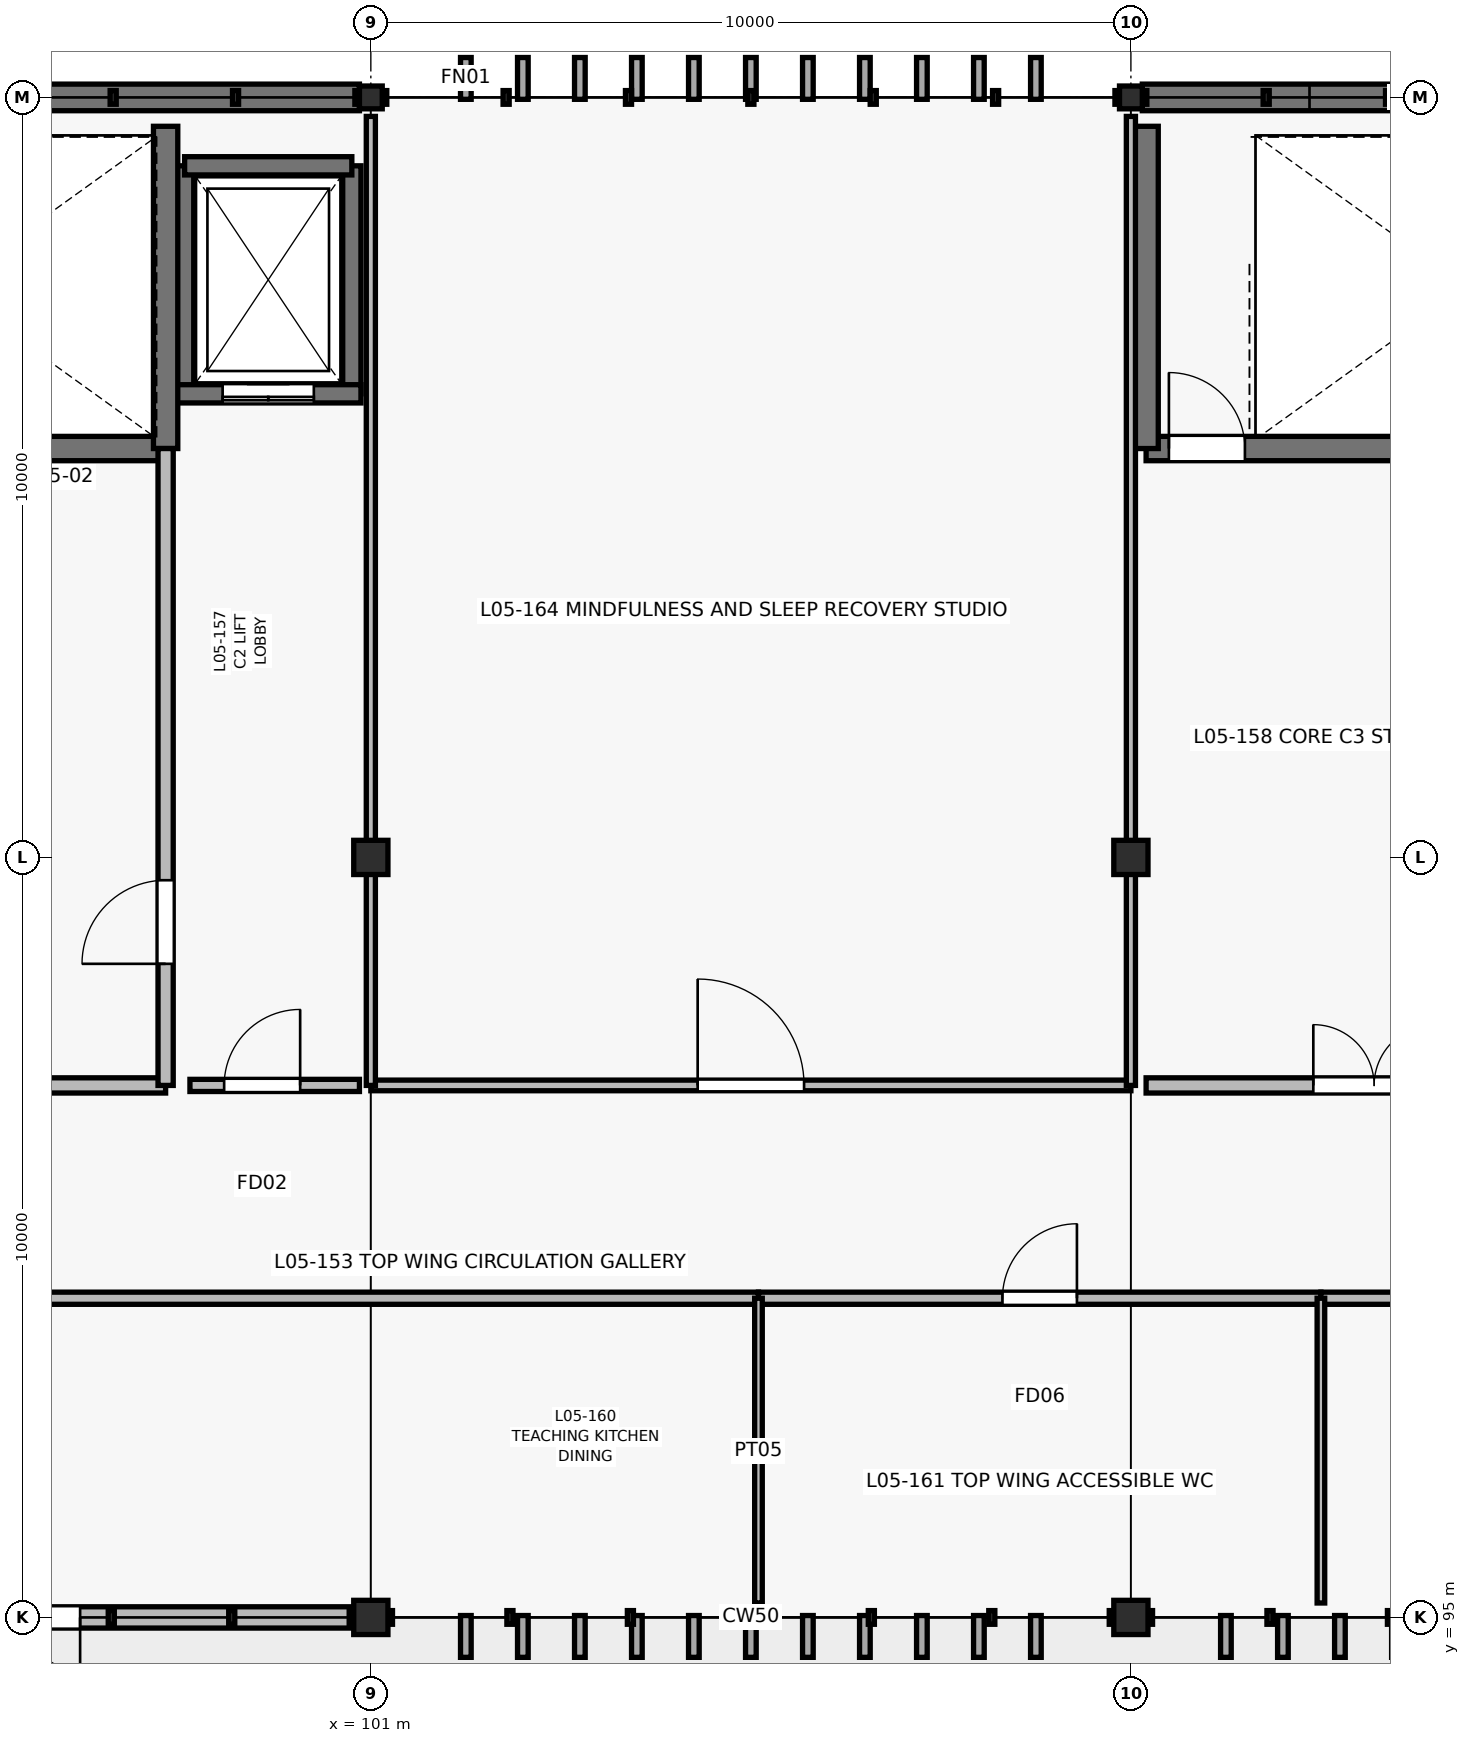
"""IFC4 building model, lengths in metres.
Left out: names, types, materials, properties, quantities, classifications, styles, units other than length and angle.
Written with IfcOpenShell. Run it as: python <this file> out.ifc"""

import sys

from ifc_helpers import new_model, si_unit, direction, frame, frame_2d, origin, origin_2d, place, context, subcontext, project, spatial, rectangle, i_section, extrude, element, fill, save


model = new_model("IFC4")
c1 = context("Model", 3, precision=1e-05, world=origin(), true_north=direction((0.0, 1.0)))
c2 = subcontext(c1, "Body", "Model", "MODEL_VIEW")
j1 = project(units=[si_unit("LENGTHUNIT", "METRE"), si_unit("PLANEANGLEUNIT", "RADIAN")], contexts=[c1])
p1 = place(None, origin())
s1 = spatial("IfcSite", under=j1, at=p1, CompositionType="ELEMENT")
p2 = place(p1, origin())
s2 = spatial("IfcBuilding", under=s1, at=p2, CompositionType="ELEMENT")
p3 = place(p2, frame((0.0, 0.0, 21.6)))
s3 = spatial("IfcBuildingStorey", under=s2, at=p3, CompositionType="ELEMENT", Elevation=21.6)
for number, where, z_axis, x_axis in (
    (1, (101.0, 95.0, 0.0), (0.0, 0.0, 1.0), (1.0, 0.0, 0.0)),
    (2, (101.0, 105.0, 0.0), (0.0, 0.0, 1.0), (1.0, 0.0, 0.0)),
):
    element("IfcColumn", number, at=place(p3, frame(where, z_axis=z_axis, x_axis=x_axis)), inside=s3, PredefinedType="COLUMN", context=c2, shape_type="SweptSolid", body=[
        extrude(rectangle(XDim=0.45, YDim=0.45, at=origin_2d()), origin(), (0.0, 0.0, 1.0), 4.2),
    ])
p4 = place(p3, frame((101.0, 115.0, 0.0), z_axis=(0.0, 0.0, 1.0), x_axis=(1.0, 0.0, 0.0)))
e3 = element("IfcColumn", 3, at=p4, inside=s3, PredefinedType="COLUMN", context=c2, shape_type="SweptSolid", body=[
    extrude(i_section(OverallWidth=0.3, OverallDepth=0.3, WebThickness=0.011, FlangeThickness=0.019, at=origin_2d()), origin(), (0.0, 0.0, 1.0), 4.2),
])
for number, where, z_axis, x_axis in (
    (4, (111.0, 95.0, 0.0), (0.0, 0.0, 1.0), (1.0, 0.0, 0.0)),
    (5, (111.0, 105.0, 0.0), (0.0, 0.0, 1.0), (1.0, 0.0, 0.0)),
):
    element("IfcColumn", number, at=place(p3, frame(where, z_axis=z_axis, x_axis=x_axis)), inside=s3, PredefinedType="COLUMN", context=c2, shape_type="SweptSolid", body=[
        extrude(rectangle(XDim=0.45, YDim=0.45, at=origin_2d()), origin(), (0.0, 0.0, 1.0), 4.2),
    ])
p5 = place(p3, frame((111.0, 115.0, 0.0), z_axis=(0.0, 0.0, 1.0), x_axis=(1.0, 0.0, 0.0)))
e6 = element("IfcColumn", 6, at=p5, inside=s3, PredefinedType="COLUMN", context=c2, shape_type="SweptSolid", body=[
    extrude(i_section(OverallWidth=0.3, OverallDepth=0.3, WebThickness=0.011, FlangeThickness=0.019, at=origin_2d()), origin(), (0.0, 0.0, 1.0), 4.2),
])
p6 = place(p3, frame((91.15, 115.0, 0.0), z_axis=(0.0, 0.0, 1.0), x_axis=(1.0, 0.0, 0.0)))
e7 = element("IfcWall", 7, at=p6, inside=s3, PredefinedType="SOLIDWALL", context=c2, shape_type="SweptSolid", body=[
    extrude(rectangle(XDim=9.7, YDim=0.35, at=frame_2d((4.85, 0.0))), origin(), (0.0, 0.0, 1.0), 4.2),
])
p7 = place(p6, frame((2.2, 0.0, 1.0)))
e8 = element("IfcOpeningElement", 8, at=p7, cuts=e7, PredefinedType="OPENING", context=c2, shape_type="SweptSolid", body=[
    extrude(rectangle(XDim=2.1, YDim=1.5, at=frame_2d((1.05, 0.75))), frame((0.0, 0.185, 0.0), z_axis=(0.0, -1.0, 0.0), x_axis=(1.0, 0.0, 0.0)), (0.0, 0.0, 1.0), 0.37),
])
p8 = place(p3, frame((111.15, 115.0, 0.0), z_axis=(0.0, 0.0, 1.0), x_axis=(1.0, 0.0, 0.0)))
e9 = element("IfcWall", 9, at=p8, inside=s3, PredefinedType="SOLIDWALL", context=c2, shape_type="SweptSolid", body=[
    extrude(rectangle(XDim=9.7, YDim=0.35, at=frame_2d((4.85, 0.0))), origin(), (0.0, 0.0, 1.0), 4.2),
])
p9 = place(p8, frame((2.2, 0.0, 1.0)))
e10 = element("IfcOpeningElement", 10, at=p9, cuts=e9, PredefinedType="OPENING", context=c2, shape_type="SweptSolid", body=[
    extrude(rectangle(XDim=2.7, YDim=1.5, at=frame_2d((1.35, 0.75))), frame((0.0, 0.185, 0.0), z_axis=(0.0, -1.0, 0.0), x_axis=(1.0, 0.0, 0.0)), (0.0, 0.0, 1.0), 0.37),
])
p10 = place(p3, frame((100.775, 95.0, 0.0), z_axis=(0.0, 0.0, 1.0), x_axis=(-1.0, 0.0, 0.0)))
e11 = element("IfcWall", 11, at=p10, inside=s3, PredefinedType="SOLIDWALL", context=c2, shape_type="SweptSolid", body=[
    extrude(rectangle(XDim=9.55, YDim=0.28, at=frame_2d((4.775, 0.0))), origin(), (0.0, 0.0, 1.0), 3.25),
])
p11 = place(p10, frame((3.6, 0.0, 0.0)))
e12 = element("IfcOpeningElement", 12, at=p11, cuts=e11, PredefinedType="OPENING", context=c2, shape_type="SweptSolid", body=[
    extrude(rectangle(XDim=1.4, YDim=2.2, at=frame_2d((0.7, 1.1))), frame((0.0, 0.15, 0.0), z_axis=(0.0, -1.0, 0.0), x_axis=(1.0, 0.0, 0.0)), (0.0, 0.0, 1.0), 0.3),
])
for number, where, z_axis, x_axis in (
    (13, (98.55, 111.1, 0.0), (0.0, 0.0, 1.0), (0.0, 1.0, 0.0)),
    (14, (100.75, 114.1, 0.0), (0.0, 0.0, 1.0), (0.0, -1.0, 0.0)),
):
    element("IfcWall", number, at=place(p3, frame(where, z_axis=z_axis, x_axis=x_axis)), inside=s3, PredefinedType="SHEAR", context=c2, shape_type="SweptSolid", body=[
        extrude(rectangle(XDim=3.0, YDim=0.24, at=frame_2d((1.5, 0.0))), origin(), (0.0, 0.0, 1.0), 3.95),
    ])
p12 = place(p3, frame((98.55, 114.1, 0.0), z_axis=(0.0, 0.0, 1.0), x_axis=(1.0, 0.0, 0.0)))
e15 = element("IfcWall", 15, at=p12, inside=s3, PredefinedType="SHEAR", context=c2, shape_type="SweptSolid", body=[
    extrude(rectangle(XDim=2.2, YDim=0.24, at=frame_2d((1.1, 0.0))), origin(), (0.0, 0.0, 1.0), 3.95),
])
p13 = place(p3, frame((100.87, 111.1, 0.0), z_axis=(0.0, 0.0, 1.0), x_axis=(-1.0, 0.0, 0.0)))
e16 = element("IfcWall", 16, at=p13, inside=s3, PredefinedType="SHEAR", context=c2, shape_type="SweptSolid", body=[
    extrude(rectangle(XDim=2.44, YDim=0.24, at=frame_2d((1.22, 0.0))), origin(), (0.0, 0.0, 1.0), 3.95),
])
p14 = place(p13, frame((0.62, 0.0, 0.0)))
e17 = element("IfcOpeningElement", 17, at=p14, cuts=e16, PredefinedType="OPENING", context=c2, shape_type="SweptSolid", body=[
    extrude(rectangle(XDim=1.2, YDim=2.15, at=frame_2d((0.6, 1.075))), frame((0.0, 0.13, 0.0), z_axis=(0.0, -1.0, 0.0), x_axis=(1.0, 0.0, 0.0)), (0.0, 0.0, 1.0), 0.26),
])
p15 = place(p3, frame((91.2, 110.38, 0.0), z_axis=(0.0, 0.0, 1.0), x_axis=(1.0, 0.0, 0.0)))
e18 = element("IfcWall", 18, at=p15, inside=s3, PredefinedType="SHEAR", context=c2, shape_type="SweptSolid", body=[
    extrude(rectangle(XDim=7.1, YDim=0.32, at=frame_2d((3.55, 0.0))), origin(), (0.0, 0.0, 1.0), 3.95),
])
p16 = place(p15, frame((0.3, 0.0, 0.0)))
e19 = element("IfcOpeningElement", 19, at=p16, cuts=e18, PredefinedType="OPENING", context=c2, shape_type="SweptSolid", body=[
    extrude(rectangle(XDim=1.0, YDim=2.15, at=frame_2d((0.5, 1.075))), frame((0.0, 0.17, 0.0), z_axis=(0.0, -1.0, 0.0), x_axis=(1.0, 0.0, 0.0)), (0.0, 0.0, 1.0), 0.34),
])
p17 = place(p3, frame((98.3, 110.38, 0.0), z_axis=(0.0, 0.0, 1.0), x_axis=(0.0, 1.0, 0.0)))
e20 = element("IfcWall", 20, at=p17, inside=s3, PredefinedType="SHEAR", context=c2, shape_type="SweptSolid", body=[
    extrude(rectangle(XDim=4.24, YDim=0.32, at=frame_2d((2.12, 0.0))), origin(), (0.0, 0.0, 1.0), 3.95),
])
p18 = place(p3, frame((91.2, 102.0, 0.0), z_axis=(0.0, 0.0, 1.0), x_axis=(1.0, 0.0, 0.0)))
e21 = element("IfcWall", 21, at=p18, inside=s3, PredefinedType="PARTITIONING", context=c2, shape_type="SweptSolid", body=[
    extrude(rectangle(XDim=7.1, YDim=0.2, at=frame_2d((3.55, 0.0))), origin(), (0.0, 0.0, 1.0), 3.25),
])
p19 = place(p18, frame((2.2, 0.0, 0.0)))
e22 = element("IfcOpeningElement", 22, at=p19, cuts=e21, PredefinedType="OPENING", context=c2, shape_type="SweptSolid", body=[
    extrude(rectangle(XDim=1.6, YDim=2.2, at=frame_2d((0.8, 1.1))), frame((0.0, 0.11, 0.0), z_axis=(0.0, -1.0, 0.0), x_axis=(1.0, 0.0, 0.0)), (0.0, 0.0, 1.0), 0.22),
])
p20 = place(p3, frame((98.3, 102.0, 0.0), z_axis=(0.0, 0.0, 1.0), x_axis=(0.0, 1.0, 0.0)))
e23 = element("IfcWall", 23, at=p20, inside=s3, PredefinedType="PARTITIONING", context=c2, shape_type="SweptSolid", body=[
    extrude(rectangle(XDim=8.38, YDim=0.2, at=frame_2d((4.19, 0.0))), origin(), (0.0, 0.0, 1.0), 3.3),
])
p21 = place(p20, frame((1.6, 0.0, 0.0)))
e24 = element("IfcOpeningElement", 24, at=p21, cuts=e23, PredefinedType="OPENING", context=c2, shape_type="SweptSolid", body=[
    extrude(rectangle(XDim=1.1, YDim=2.15, at=frame_2d((0.55, 1.075))), frame((0.0, 0.11, 0.0), z_axis=(0.0, -1.0, 0.0), x_axis=(1.0, 0.0, 0.0)), (0.0, 0.0, 1.0), 0.22),
])
p22 = place(p3, frame((98.62, 102.0, 0.0), z_axis=(0.0, 0.0, 1.0), x_axis=(1.0, 0.0, 0.0)))
e25 = element("IfcWall", 25, at=p22, inside=s3, PredefinedType="PARTITIONING", context=c2, shape_type="SweptSolid", body=[
    extrude(rectangle(XDim=2.23, YDim=0.16, at=frame_2d((1.115, 0.0))), origin(), (0.0, 0.0, 1.0), 3.25),
])
p23 = place(p22, frame((0.45, 0.0, 0.0)))
e26 = element("IfcOpeningElement", 26, at=p23, cuts=e25, PredefinedType="OPENING", context=c2, shape_type="SweptSolid", body=[
    extrude(rectangle(XDim=1.0, YDim=2.15, at=frame_2d((0.5, 1.075))), frame((0.0, 0.09, 0.0), z_axis=(0.0, -1.0, 0.0), x_axis=(1.0, 0.0, 0.0)), (0.0, 0.0, 1.0), 0.18),
])
p24 = place(p3, frame((111.2, 110.38, 0.0), z_axis=(0.0, 0.0, 1.0), x_axis=(1.0, 0.0, 0.0)))
e27 = element("IfcWall", 27, at=p24, inside=s3, PredefinedType="SHEAR", context=c2, shape_type="SweptSolid", body=[
    extrude(rectangle(XDim=7.1, YDim=0.32, at=frame_2d((3.55, 0.0))), origin(), (0.0, 0.0, 1.0), 3.95),
])
p25 = place(p24, frame((0.3, 0.0, 0.0)))
e28 = element("IfcOpeningElement", 28, at=p25, cuts=e27, PredefinedType="OPENING", context=c2, shape_type="SweptSolid", body=[
    extrude(rectangle(XDim=1.0, YDim=2.15, at=frame_2d((0.5, 1.075))), frame((0.0, 0.17, 0.0), z_axis=(0.0, -1.0, 0.0), x_axis=(1.0, 0.0, 0.0)), (0.0, 0.0, 1.0), 0.34),
])
p26 = place(p3, frame((111.2, 114.62, 0.0), z_axis=(0.0, 0.0, 1.0), x_axis=(0.0, -1.0, 0.0)))
e29 = element("IfcWall", 29, at=p26, inside=s3, PredefinedType="SHEAR", context=c2, shape_type="SweptSolid", body=[
    extrude(rectangle(XDim=4.24, YDim=0.32, at=frame_2d((2.12, 0.0))), origin(), (0.0, 0.0, 1.0), 3.95),
])
p27 = place(p3, frame((111.2, 102.0, 0.0), z_axis=(0.0, 0.0, 1.0), x_axis=(1.0, 0.0, 0.0)))
e30 = element("IfcWall", 30, at=p27, inside=s3, PredefinedType="PARTITIONING", context=c2, shape_type="SweptSolid", body=[
    extrude(rectangle(XDim=7.1, YDim=0.2, at=frame_2d((3.55, 0.0))), origin(), (0.0, 0.0, 1.0), 3.25),
])
p28 = place(p27, frame((2.2, 0.0, 0.0)))
e31 = element("IfcOpeningElement", 31, at=p28, cuts=e30, PredefinedType="OPENING", context=c2, shape_type="SweptSolid", body=[
    extrude(rectangle(XDim=1.6, YDim=2.2, at=frame_2d((0.8, 1.1))), frame((0.0, 0.11, 0.0), z_axis=(0.0, -1.0, 0.0), x_axis=(1.0, 0.0, 0.0)), (0.0, 0.0, 1.0), 0.22),
])
p29 = place(p3, frame((86.1, 99.2, 0.0), z_axis=(0.0, 0.0, 1.0), x_axis=(1.0, 0.0, 0.0)))
e32 = element("IfcWall", 32, at=p29, inside=s3, PredefinedType="PARTITIONING", context=c2, shape_type="SweptSolid", body=[
    extrude(rectangle(XDim=20.0, YDim=0.16, at=frame_2d((10.0, 0.0))), origin(), (0.0, 0.0, 1.0), 3.25),
])
p30 = place(p29, frame((9.475, 0.0, 0.0)))
e33 = element("IfcOpeningElement", 33, at=p30, cuts=e32, PredefinedType="OPENING", context=c2, shape_type="SweptSolid", body=[
    extrude(rectangle(XDim=1.05, YDim=2.1, at=frame_2d((0.525, 1.05))), frame((0.0, 0.09, 0.0), z_axis=(0.0, -1.0, 0.0), x_axis=(1.0, 0.0, 0.0)), (0.0, 0.0, 1.0), 0.18),
])
p31 = place(p3, frame((106.1, 99.2, 0.0), z_axis=(0.0, 0.0, 1.0), x_axis=(1.0, 0.0, 0.0)))
e34 = element("IfcWall", 34, at=p31, inside=s3, PredefinedType="PARTITIONING", context=c2, shape_type="SweptSolid", body=[
    extrude(rectangle(XDim=7.4, YDim=0.16, at=frame_2d((3.7, 0.0))), origin(), (0.0, 0.0, 1.0), 3.25),
])
p32 = place(p31, frame((3.21, 0.0, 0.0)))
e35 = element("IfcOpeningElement", 35, at=p32, cuts=e34, PredefinedType="OPENING", context=c2, shape_type="SweptSolid", body=[
    extrude(rectangle(XDim=0.98, YDim=2.1, at=frame_2d((0.49, 1.05))), frame((0.0, 0.09, 0.0), z_axis=(0.0, -1.0, 0.0), x_axis=(1.0, 0.0, 0.0)), (0.0, 0.0, 1.0), 0.18),
])
p33 = place(p3, frame((106.1, 95.19, 0.0), z_axis=(0.0, 0.0, 1.0), x_axis=(0.0, 1.0, 0.0)))
e36 = element("IfcWall", 36, at=p33, inside=s3, PredefinedType="PARTITIONING", context=c2, shape_type="SweptSolid", body=[
    extrude(rectangle(XDim=4.01, YDim=0.1, at=frame_2d((2.005, 0.0))), origin(), (0.0, 0.0, 1.0), 3.3),
])
p34 = place(p3, frame((113.5, 99.2, 0.0), z_axis=(0.0, 0.0, 1.0), x_axis=(1.0, 0.0, 0.0)))
e37 = element("IfcWall", 37, at=p34, inside=s3, PredefinedType="PARTITIONING", context=c2, shape_type="SweptSolid", body=[
    extrude(rectangle(XDim=7.32, YDim=0.16, at=frame_2d((3.66, 0.0))), origin(), (0.0, 0.0, 1.0), 3.25),
])
p35 = place(p34, frame((3.17, 0.0, 0.0)))
e38 = element("IfcOpeningElement", 38, at=p35, cuts=e37, PredefinedType="OPENING", context=c2, shape_type="SweptSolid", body=[
    extrude(rectangle(XDim=0.98, YDim=2.1, at=frame_2d((0.49, 1.05))), frame((0.0, 0.09, 0.0), z_axis=(0.0, -1.0, 0.0), x_axis=(1.0, 0.0, 0.0)), (0.0, 0.0, 1.0), 0.18),
])
p36 = place(p3, frame((113.5, 95.19, 0.0), z_axis=(0.0, 0.0, 1.0), x_axis=(0.0, 1.0, 0.0)))
e39 = element("IfcWall", 39, at=p36, inside=s3, PredefinedType="PARTITIONING", context=c2, shape_type="SweptSolid", body=[
    extrude(rectangle(XDim=4.01, YDim=0.1, at=frame_2d((2.005, 0.0))), origin(), (0.0, 0.0, 1.0), 3.3),
])
p37 = place(p3, frame((101.0, 102.0, 0.0), z_axis=(0.0, 0.0, 1.0), x_axis=(1.0, 0.0, 0.0)))
e40 = element("IfcWall", 40, at=p37, inside=s3, PredefinedType="PARTITIONING", context=c2, shape_type="SweptSolid", body=[
    extrude(rectangle(XDim=10.0, YDim=0.14, at=frame_2d((5.0, 0.0))), origin(), (0.0, 0.0, 1.0), 3.25),
])
p38 = place(p37, frame((4.3, 0.0, 0.0)))
e41 = element("IfcOpeningElement", 41, at=p38, cuts=e40, PredefinedType="OPENING", context=c2, shape_type="SweptSolid", body=[
    extrude(rectangle(XDim=1.4, YDim=2.2, at=frame_2d((0.7, 1.1))), frame((0.0, 0.08, 0.0), z_axis=(0.0, -1.0, 0.0), x_axis=(1.0, 0.0, 0.0)), (0.0, 0.0, 1.0), 0.16),
])
for number, where, z_axis, x_axis in (
    (42, (101.0, 102.0, 0.0), (0.0, 0.0, 1.0), (0.0, 1.0, 0.0)),
    (43, (111.0, 102.0, 0.0), (0.0, 0.0, 1.0), (0.0, 1.0, 0.0)),
):
    element("IfcWall", number, at=place(p3, frame(where, z_axis=z_axis, x_axis=x_axis)), inside=s3, PredefinedType="PARTITIONING", context=c2, shape_type="SweptSolid", body=[
        extrude(rectangle(XDim=12.75, YDim=0.12, at=frame_2d((6.375, 0.0))), origin(), (0.0, 0.0, 1.0), 3.25),
    ])
p39 = place(p9, origin())
e44 = element("IfcWindow", 44, at=p39, inside=s3, PartitioningType="DOUBLE_PANEL_VERTICAL", PredefinedType="WINDOW", context=c2, shape_type="SweptSolid", body=[
    extrude(rectangle(XDim=2.7, YDim=1.5, at=frame_2d((1.35, 0.75))), frame((0.0, 0.03, 0.0), z_axis=(0.0, -1.0, 0.0), x_axis=(1.0, 0.0, 0.0)), (0.0, 0.0, 1.0), 0.06),
])
fill(e10, e44)
p40 = place(p11, origin())
e45 = element("IfcDoor", 45, at=p40, inside=s3, OperationType="DOUBLE_DOOR_SINGLE_SWING", PredefinedType="DOOR", context=c2, shape_type="SweptSolid", body=[
    extrude(rectangle(XDim=1.4, YDim=2.2, at=frame_2d((0.7, 1.1))), frame((0.0, 0.025, 0.0), z_axis=(0.0, -1.0, 0.0), x_axis=(1.0, 0.0, 0.0)), (0.0, 0.0, 1.0), 0.05),
])
fill(e12, e45)
p41 = place(p14, origin())
e46 = element("IfcDoor", 46, at=p41, inside=s3, OperationType="DOUBLE_DOOR_SLIDING", PredefinedType="USERDEFINED", context=c2, shape_type="SweptSolid", body=[
    extrude(rectangle(XDim=1.2, YDim=2.15, at=frame_2d((0.6, 1.075))), frame((0.0, 0.025, 0.0), z_axis=(0.0, -1.0, 0.0), x_axis=(1.0, 0.0, 0.0)), (0.0, 0.0, 1.0), 0.05),
])
fill(e17, e46)
p42 = place(p21, origin())
e47 = element("IfcDoor", 47, at=p42, inside=s3, OperationType="SINGLE_SWING_LEFT", PredefinedType="DOOR", context=c2, shape_type="SweptSolid", body=[
    extrude(rectangle(XDim=1.1, YDim=2.15, at=frame_2d((0.55, 1.075))), frame((0.0, 0.025, 0.0), z_axis=(0.0, -1.0, 0.0), x_axis=(1.0, 0.0, 0.0)), (0.0, 0.0, 1.0), 0.05),
])
fill(e24, e47)
p43 = place(p23, origin())
e48 = element("IfcDoor", 48, at=p43, inside=s3, OperationType="SINGLE_SWING_RIGHT", PredefinedType="DOOR", context=c2, shape_type="SweptSolid", body=[
    extrude(rectangle(XDim=1.0, YDim=2.15, at=frame_2d((0.5, 1.075))), frame((0.0, 0.025, 0.0), z_axis=(0.0, -1.0, 0.0), x_axis=(1.0, 0.0, 0.0)), (0.0, 0.0, 1.0), 0.05),
])
fill(e26, e48)
p44 = place(p25, origin())
e49 = element("IfcDoor", 49, at=p44, inside=s3, OperationType="SINGLE_SWING_LEFT", PredefinedType="DOOR", context=c2, shape_type="SweptSolid", body=[
    extrude(rectangle(XDim=1.0, YDim=2.15, at=frame_2d((0.5, 1.075))), frame((0.0, 0.025, 0.0), z_axis=(0.0, -1.0, 0.0), x_axis=(1.0, 0.0, 0.0)), (0.0, 0.0, 1.0), 0.05),
])
fill(e28, e49)
p45 = place(p28, origin())
e50 = element("IfcDoor", 50, at=p45, inside=s3, OperationType="DOUBLE_DOOR_SINGLE_SWING", PredefinedType="DOOR", context=c2, shape_type="SweptSolid", body=[
    extrude(rectangle(XDim=1.6, YDim=2.2, at=frame_2d((0.8, 1.1))), frame((0.0, 0.025, 0.0), z_axis=(0.0, -1.0, 0.0), x_axis=(1.0, 0.0, 0.0)), (0.0, 0.0, 1.0), 0.05),
])
fill(e31, e50)
p46 = place(p32, origin())
e51 = element("IfcDoor", 51, at=p46, inside=s3, OperationType="SINGLE_SWING_RIGHT", PredefinedType="DOOR", context=c2, shape_type="SweptSolid", body=[
    extrude(rectangle(XDim=0.98, YDim=2.1, at=frame_2d((0.49, 1.05))), frame((0.0, 0.025, 0.0), z_axis=(0.0, -1.0, 0.0), x_axis=(1.0, 0.0, 0.0)), (0.0, 0.0, 1.0), 0.05),
])
fill(e35, e51)
p47 = place(p38, origin())
e52 = element("IfcDoor", 52, at=p47, inside=s3, OperationType="SINGLE_SWING_LEFT", PredefinedType="DOOR", context=c2, shape_type="SweptSolid", body=[
    extrude(rectangle(XDim=1.4, YDim=2.2, at=frame_2d((0.7, 1.1))), frame((0.0, 0.025, 0.0), z_axis=(0.0, -1.0, 0.0), x_axis=(1.0, 0.0, 0.0)), (0.0, 0.0, 1.0), 0.05),
])
fill(e41, e52)
save(model, sys.argv[1])
